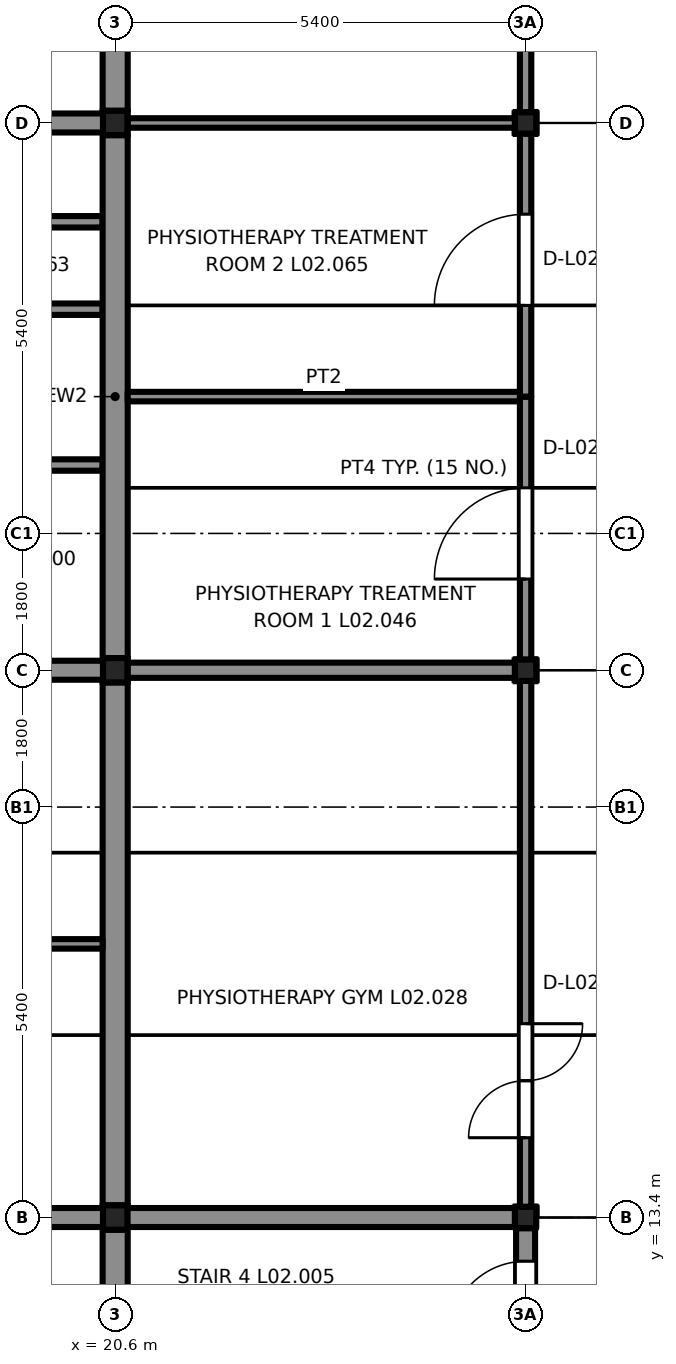
"""IFC4 building model, lengths in metres.
Left out: names, types, materials, properties, quantities, classifications, styles, units other than length and angle.
Written with IfcOpenShell. Run it as: python <this file> out.ifc"""

import sys

from ifc_helpers import new_model, si_unit, direction, frame, frame_2d, origin, origin_2d, place, context, subcontext, project, spatial, rectangle, extrude, element, fill, save


model = new_model("IFC4")
c1 = context("Model", 3, precision=1e-05, world=origin(), true_north=direction((0.0, 1.0)))
c2 = subcontext(c1, "Body", "Model", "MODEL_VIEW")
j1 = project(units=[si_unit("LENGTHUNIT", "METRE"), si_unit("PLANEANGLEUNIT", "RADIAN")], contexts=[c1])
p1 = place(None, origin())
s1 = spatial("IfcSite", under=j1, at=p1, CompositionType="ELEMENT")
p2 = place(p1, origin())
s2 = spatial("IfcBuilding", under=s1, at=p2, CompositionType="ELEMENT")
p3 = place(p2, frame((0.0, 0.0, 10.2)))
s3 = spatial("IfcBuildingStorey", under=s2, at=p3, CompositionType="ELEMENT", Elevation=10.2)
for number, where, z_axis, x_axis in (
    (1, (20.6, 13.4, 0.0), (0.0, 0.0, 1.0), (1.0, 0.0, 0.0)),
    (2, (20.6, 20.6, 0.0), (0.0, 0.0, 1.0), (1.0, 0.0, 0.0)),
    (3, (20.6, 27.8, 0.0), (0.0, 0.0, 1.0), (1.0, 0.0, 0.0)),
):
    element("IfcColumn", number, at=place(p3, frame(where, z_axis=z_axis, x_axis=x_axis)), inside=s3, PredefinedType="COLUMN", context=c2, shape_type="SweptSolid", body=[
        extrude(rectangle(XDim=0.32, YDim=0.32, at=origin_2d()), origin(), (0.0, 0.0, 1.0), 3.9),
    ])
for number, where, z_axis, x_axis in (
    (4, (26.0, 13.4, 0.0), (0.0, 0.0, 1.0), (1.0, 0.0, 0.0)),
    (5, (26.0, 20.6, 0.0), (0.0, 0.0, 1.0), (1.0, 0.0, 0.0)),
    (6, (26.0, 27.8, 0.0), (0.0, 0.0, 1.0), (1.0, 0.0, 0.0)),
):
    element("IfcColumn", number, at=place(p3, frame(where, z_axis=z_axis, x_axis=x_axis)), inside=s3, PredefinedType="COLUMN", context=c2, shape_type="SweptSolid", body=[
        extrude(rectangle(XDim=0.28, YDim=0.28, at=origin_2d()), origin(), (0.0, 0.0, 1.0), 3.9),
    ])
for number, where, z_axis, x_axis in (
    (7, (15.36, 13.4, 0.0), (0.0, 0.0, 1.0), (1.0, 0.0, 0.0)),
    (8, (15.36, 20.6, 0.0), (0.0, 0.0, 1.0), (1.0, 0.0, 0.0)),
    (9, (15.36, 27.8, 0.0), (0.0, 0.0, 1.0), (1.0, 0.0, 0.0)),
):
    element("IfcWall", number, at=place(p3, frame(where, z_axis=z_axis, x_axis=x_axis)), inside=s3, PredefinedType="SHEAR", context=c2, shape_type="SweptSolid", body=[
        extrude(rectangle(XDim=5.08, YDim=0.25, at=frame_2d((2.54, 0.0))), origin(), (0.0, 0.0, 1.0), 3.65),
    ])
for number, where, z_axis, x_axis in (
    (10, (15.325, 23.3, 0.0), (0.0, 0.0, 1.0), (1.0, 0.0, 0.0)),
    (11, (15.325, 25.35, 0.0), (0.0, 0.0, 1.0), (1.0, 0.0, 0.0)),
    (12, (15.325, 26.5, 0.0), (0.0, 0.0, 1.0), (1.0, 0.0, 0.0)),
):
    element("IfcWall", number, at=place(p3, frame(where, z_axis=z_axis, x_axis=x_axis)), inside=s3, PredefinedType="PARTITIONING", context=c2, shape_type="SweptSolid", body=[
        extrude(rectangle(XDim=5.11, YDim=0.15, at=frame_2d((2.555, 0.0))), origin(), (0.0, 0.0, 1.0), 3.65),
    ])
p4 = place(p3, frame((26.0, 6.365, 0.0), z_axis=(0.0, 0.0, 1.0), x_axis=(0.0, 1.0, 0.0)))
e13 = element("IfcWall", 13, at=p4, inside=s3, PredefinedType="SHEAR", context=c2, shape_type="SweptSolid", body=[
    extrude(rectangle(XDim=6.895, YDim=0.25, at=frame_2d((3.448, 0.0))), origin(), (0.0, 0.0, 1.0), 3.65),
])
p5 = place(p4, frame((5.46, 0.0, 0.0)))
e14 = element("IfcOpeningElement", 14, at=p5, cuts=e13, PredefinedType="OPENING", context=c2, shape_type="SweptSolid", body=[
    extrude(rectangle(XDim=1.0, YDim=2.1, at=frame_2d((0.5, 1.05))), frame((0.0, 0.135, 0.0), z_axis=(0.0, -1.0, 0.0), x_axis=(1.0, 0.0, 0.0)), (0.0, 0.0, 1.0), 0.27),
])
p6 = place(p3, frame((20.76, 13.4, 0.0), z_axis=(0.0, 0.0, 1.0), x_axis=(1.0, 0.0, 0.0)))
e15 = element("IfcWall", 15, at=p6, inside=s3, PredefinedType="SHEAR", context=c2, shape_type="SweptSolid", body=[
    extrude(rectangle(XDim=5.1, YDim=0.25, at=frame_2d((2.55, 0.0))), origin(), (0.0, 0.0, 1.0), 3.65),
])
p7 = place(p3, frame((20.6, 13.24, 0.0), z_axis=(0.0, 0.0, 1.0), x_axis=(0.0, -1.0, 0.0)))
e16 = element("IfcWall", 16, at=p7, inside=s3, PredefinedType="SOLIDWALL", context=c2, shape_type="SweptSolid", body=[
    extrude(rectangle(XDim=7.205, YDim=0.33, at=frame_2d((3.603, 0.0))), origin(), (0.0, 0.0, 1.0), 3.22),
])
for number, where, z_axis, x_axis in (
    (17, (20.6, 20.44, 0.0), (0.0, 0.0, 1.0), (0.0, -1.0, 0.0)),
    (18, (20.6, 27.64, 0.0), (0.0, 0.0, 1.0), (0.0, -1.0, 0.0)),
):
    element("IfcWall", number, at=place(p3, frame(where, z_axis=z_axis, x_axis=x_axis)), inside=s3, PredefinedType="SOLIDWALL", context=c2, shape_type="SweptSolid", body=[
        extrude(rectangle(XDim=6.88, YDim=0.33, at=frame_2d((3.44, 0.0))), origin(), (0.0, 0.0, 1.0), 3.22),
    ])
p8 = place(p3, frame((20.6, 34.84, 0.0), z_axis=(0.0, 0.0, 1.0), x_axis=(0.0, -1.0, 0.0)))
e19 = element("IfcWall", 19, at=p8, inside=s3, PredefinedType="SOLIDWALL", context=c2, shape_type="SweptSolid", body=[
    extrude(rectangle(XDim=6.88, YDim=0.33, at=frame_2d((3.44, 0.0))), origin(), (0.0, 0.0, 1.0), 3.22),
])
p9 = place(p3, frame((20.435, 17.0, 0.0), z_axis=(0.0, 0.0, 1.0), x_axis=(-1.0, 0.0, 0.0)))
e20 = element("IfcWall", 20, at=p9, inside=s3, PredefinedType="PARTITIONING", context=c2, shape_type="SweptSolid", body=[
    extrude(rectangle(XDim=5.16, YDim=0.125, at=frame_2d((2.58, 0.0))), origin(), (0.0, 0.0, 1.0), 3.38),
])
p10 = place(p3, frame((26.0, 13.54, 0.0), z_axis=(0.0, 0.0, 1.0), x_axis=(0.0, 1.0, 0.0)))
e21 = element("IfcWall", 21, at=p10, inside=s3, PredefinedType="PARTITIONING", context=c2, shape_type="SweptSolid", body=[
    extrude(rectangle(XDim=6.92, YDim=0.15, at=frame_2d((3.46, 0.0))), origin(), (0.0, 0.0, 1.0), 3.22),
])
p11 = place(p10, frame((0.91, 0.0, 0.0)))
e22 = element("IfcOpeningElement", 22, at=p11, cuts=e21, PredefinedType="OPENING", context=c2, shape_type="SweptSolid", body=[
    extrude(rectangle(XDim=1.5, YDim=2.1, at=frame_2d((0.75, 1.05))), frame((0.0, 0.085, 0.0), z_axis=(0.0, -1.0, 0.0), x_axis=(1.0, 0.0, 0.0)), (0.0, 0.0, 1.0), 0.17),
])
p12 = place(p3, frame((26.0, 20.74, 0.0), z_axis=(0.0, 0.0, 1.0), x_axis=(0.0, 1.0, 0.0)))
e23 = element("IfcWall", 23, at=p12, inside=s3, PredefinedType="PARTITIONING", context=c2, shape_type="SweptSolid", body=[
    extrude(rectangle(XDim=3.46, YDim=0.15, at=frame_2d((1.73, 0.0))), origin(), (0.0, 0.0, 1.0), 3.22),
])
p13 = place(p12, frame((1.06, 0.0, 0.0)))
e24 = element("IfcOpeningElement", 24, at=p13, cuts=e23, PredefinedType="OPENING", context=c2, shape_type="SweptSolid", body=[
    extrude(rectangle(XDim=1.2, YDim=2.1, at=frame_2d((0.6, 1.05))), frame((0.0, 0.085, 0.0), z_axis=(0.0, -1.0, 0.0), x_axis=(1.0, 0.0, 0.0)), (0.0, 0.0, 1.0), 0.17),
])
p14 = place(p3, frame((20.765, 20.6, 0.0), z_axis=(0.0, 0.0, 1.0), x_axis=(1.0, 0.0, 0.0)))
e25 = element("IfcWall", 25, at=p14, inside=s3, PredefinedType="PARTITIONING", context=c2, shape_type="SweptSolid", body=[
    extrude(rectangle(XDim=5.095, YDim=0.2, at=frame_2d((2.548, 0.0))), origin(), (0.0, 0.0, 1.0), 3.38),
])
p15 = place(p3, frame((26.0, 24.2, 0.0), z_axis=(0.0, 0.0, 1.0), x_axis=(0.0, 1.0, 0.0)))
e26 = element("IfcWall", 26, at=p15, inside=s3, PredefinedType="PARTITIONING", context=c2, shape_type="SweptSolid", body=[
    extrude(rectangle(XDim=3.46, YDim=0.15, at=frame_2d((1.73, 0.0))), origin(), (0.0, 0.0, 1.0), 3.22),
])
p16 = place(p15, frame((1.2, 0.0, 0.0)))
e27 = element("IfcOpeningElement", 27, at=p16, cuts=e26, PredefinedType="OPENING", context=c2, shape_type="SweptSolid", body=[
    extrude(rectangle(XDim=1.2, YDim=2.1, at=frame_2d((0.6, 1.05))), frame((0.0, 0.085, 0.0), z_axis=(0.0, -1.0, 0.0), x_axis=(1.0, 0.0, 0.0)), (0.0, 0.0, 1.0), 0.17),
])
p17 = place(p3, frame((20.765, 24.2, 0.0), z_axis=(0.0, 0.0, 1.0), x_axis=(1.0, 0.0, 0.0)))
e28 = element("IfcWall", 28, at=p17, inside=s3, PredefinedType="PARTITIONING", context=c2, shape_type="SweptSolid", body=[
    extrude(rectangle(XDim=5.16, YDim=0.125, at=frame_2d((2.58, 0.0))), origin(), (0.0, 0.0, 1.0), 3.38),
])
p18 = place(p3, frame((26.0, 27.94, 0.0), z_axis=(0.0, 0.0, 1.0), x_axis=(0.0, 1.0, 0.0)))
e29 = element("IfcWall", 29, at=p18, inside=s3, PredefinedType="PARTITIONING", context=c2, shape_type="SweptSolid", body=[
    extrude(rectangle(XDim=6.92, YDim=0.15, at=frame_2d((3.46, 0.0))), origin(), (0.0, 0.0, 1.0), 3.22),
])
p19 = place(p18, frame((1.16, 0.0, 0.0)))
e30 = element("IfcOpeningElement", 30, at=p19, cuts=e29, PredefinedType="OPENING", context=c2, shape_type="SweptSolid", body=[
    extrude(rectangle(XDim=1.0, YDim=2.1, at=frame_2d((0.5, 1.05))), frame((0.0, 0.085, 0.0), z_axis=(0.0, -1.0, 0.0), x_axis=(1.0, 0.0, 0.0)), (0.0, 0.0, 1.0), 0.17),
])
p20 = place(p3, frame((20.765, 27.8, 0.0), z_axis=(0.0, 0.0, 1.0), x_axis=(1.0, 0.0, 0.0)))
e31 = element("IfcWall", 31, at=p20, inside=s3, PredefinedType="PARTITIONING", context=c2, shape_type="SweptSolid", body=[
    extrude(rectangle(XDim=5.095, YDim=0.125, at=frame_2d((2.548, 0.0))), origin(), (0.0, 0.0, 1.0), 3.38),
])
p21 = place(p5, origin())
e32 = element("IfcDoor", 32, at=p21, inside=s3, OperationType="SINGLE_SWING_RIGHT", PredefinedType="DOOR", context=c2, shape_type="SweptSolid", body=[
    extrude(rectangle(XDim=1.0, YDim=2.1, at=frame_2d((0.5, 1.05))), frame((0.0, 0.025, 0.0), z_axis=(0.0, -1.0, 0.0), x_axis=(1.0, 0.0, 0.0)), (0.0, 0.0, 1.0), 0.05),
])
fill(e14, e32)
p22 = place(p11, origin())
e33 = element("IfcDoor", 33, at=p22, inside=s3, OperationType="DOUBLE_DOOR_SINGLE_SWING", PredefinedType="DOOR", context=c2, shape_type="SweptSolid", body=[
    extrude(rectangle(XDim=1.5, YDim=2.1, at=frame_2d((0.75, 1.05))), frame((0.0, 0.025, 0.0), z_axis=(0.0, -1.0, 0.0), x_axis=(1.0, 0.0, 0.0)), (0.0, 0.0, 1.0), 0.05),
])
fill(e22, e33)
p23 = place(p13, origin())
e34 = element("IfcDoor", 34, at=p23, inside=s3, OperationType="SINGLE_SWING_LEFT", PredefinedType="DOOR", context=c2, shape_type="SweptSolid", body=[
    extrude(rectangle(XDim=1.2, YDim=2.1, at=frame_2d((0.6, 1.05))), frame((0.0, 0.025, 0.0), z_axis=(0.0, -1.0, 0.0), x_axis=(1.0, 0.0, 0.0)), (0.0, 0.0, 1.0), 0.05),
])
fill(e24, e34)
p24 = place(p16, origin())
e35 = element("IfcDoor", 35, at=p24, inside=s3, OperationType="SINGLE_SWING_RIGHT", PredefinedType="DOOR", context=c2, shape_type="SweptSolid", body=[
    extrude(rectangle(XDim=1.2, YDim=2.1, at=frame_2d((0.6, 1.05))), frame((0.0, 0.025, 0.0), z_axis=(0.0, -1.0, 0.0), x_axis=(1.0, 0.0, 0.0)), (0.0, 0.0, 1.0), 0.05),
])
fill(e27, e35)
save(model, sys.argv[1])
